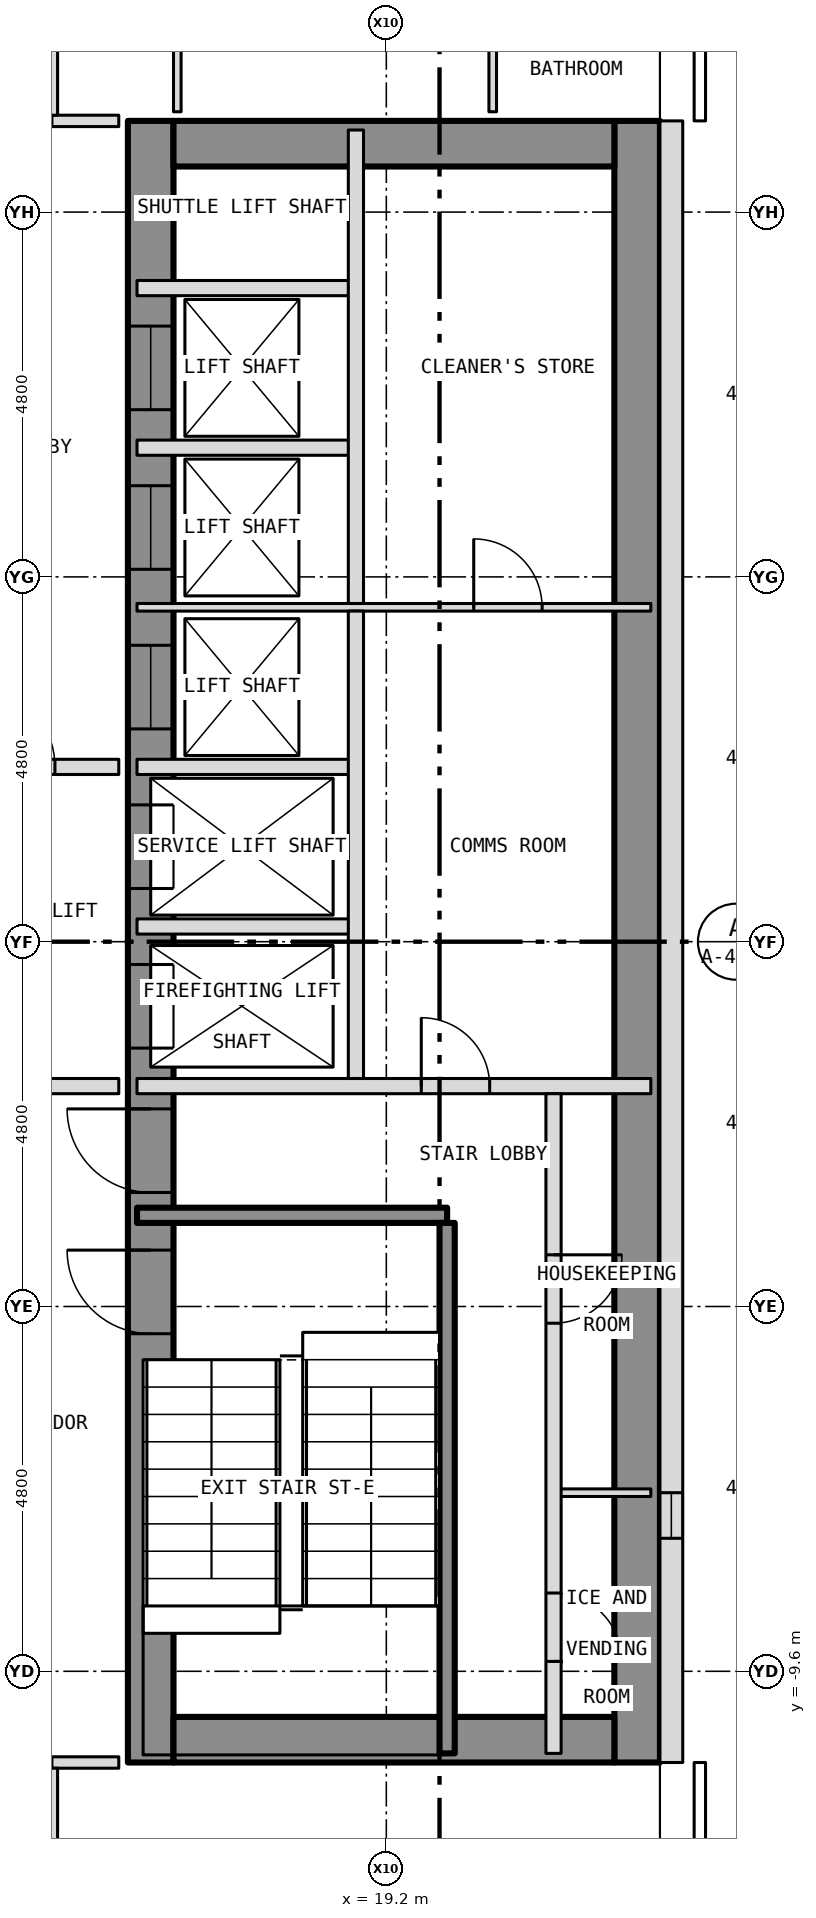
"""IFC4 building model, lengths in metres.
Left out: names, types, materials, properties, quantities, classifications, styles, units other than length and angle.
Written with IfcOpenShell. Run it as: python <this file> out.ifc"""

import sys

from ifc_helpers import new_model, si_unit, direction, frame, frame_2d, origin, place, context, subcontext, project, spatial, rectangle, extrude, element, fill, save


model = new_model("IFC4")
c1 = context("Model", 3, precision=1e-05, world=origin(), true_north=direction((0.0, 1.0)))
c2 = subcontext(c1, "Body", "Model", "MODEL_VIEW")
j1 = project(units=[si_unit("LENGTHUNIT", "METRE"), si_unit("PLANEANGLEUNIT", "RADIAN")], contexts=[c1])
p1 = place(None, origin())
s1 = spatial("IfcSite", under=j1, at=p1, CompositionType="ELEMENT")
p2 = place(p1, origin())
s2 = spatial("IfcBuilding", under=s1, at=p2, CompositionType="ELEMENT")
p3 = place(p2, frame((0.0, 0.0, 134.5)))
s3 = spatial("IfcBuildingStorey", under=s2, at=p3, CompositionType="ELEMENT", Elevation=134.5)
p4 = place(p3, frame((16.1, -10.8, 0.0), z_axis=(0.0, 0.0, 1.0), x_axis=(0.0, 1.0, 0.0)))
e1 = element("IfcWall", 1, at=p4, inside=s3, PredefinedType="SHEAR", context=c2, shape_type="SweptSolid", body=[
    extrude(rectangle(XDim=21.6, YDim=0.6, at=frame_2d((10.8, 0.0))), origin(), (0.0, 0.0, 1.0), 2.9),
])
p5 = place(p4, frame((9.4, 0.0, 0.0)))
e2 = element("IfcOpeningElement", 2, at=p5, cuts=e1, PredefinedType="OPENING", context=c2, shape_type="SweptSolid", body=[
    extrude(rectangle(XDim=1.1, YDim=2.1, at=frame_2d((0.55, 1.05))), frame((0.0, 0.312, 0.0), z_axis=(0.0, -1.0, 0.0), x_axis=(1.0, 0.0, 0.0)), (0.0, 0.0, 1.0), 0.624),
])
p6 = place(p4, frame((11.5, 0.0, 0.0)))
e3 = element("IfcOpeningElement", 3, at=p6, cuts=e1, PredefinedType="OPENING", context=c2, shape_type="SweptSolid", body=[
    extrude(rectangle(XDim=1.1, YDim=2.1, at=frame_2d((0.55, 1.05))), frame((0.0, 0.312, 0.0), z_axis=(0.0, -1.0, 0.0), x_axis=(1.0, 0.0, 0.0)), (0.0, 0.0, 1.0), 0.624),
])
p7 = place(p4, frame((13.6, 0.0, 0.0)))
e4 = element("IfcOpeningElement", 4, at=p7, cuts=e1, PredefinedType="OPENING", context=c2, shape_type="SweptSolid", body=[
    extrude(rectangle(XDim=1.1, YDim=2.1, at=frame_2d((0.55, 1.05))), frame((0.0, 0.312, 0.0), z_axis=(0.0, -1.0, 0.0), x_axis=(1.0, 0.0, 0.0)), (0.0, 0.0, 1.0), 0.624),
])
p8 = place(p4, frame((15.7, 0.0, 0.0)))
e5 = element("IfcOpeningElement", 5, at=p8, cuts=e1, PredefinedType="OPENING", context=c2, shape_type="SweptSolid", body=[
    extrude(rectangle(XDim=1.1, YDim=2.1, at=frame_2d((0.55, 1.05))), frame((0.0, 0.312, 0.0), z_axis=(0.0, -1.0, 0.0), x_axis=(1.0, 0.0, 0.0)), (0.0, 0.0, 1.0), 0.624),
])
p9 = place(p4, frame((17.8, 0.0, 0.0)))
e6 = element("IfcOpeningElement", 6, at=p9, cuts=e1, PredefinedType="OPENING", context=c2, shape_type="SweptSolid", body=[
    extrude(rectangle(XDim=1.1, YDim=2.1, at=frame_2d((0.55, 1.05))), frame((0.0, 0.312, 0.0), z_axis=(0.0, -1.0, 0.0), x_axis=(1.0, 0.0, 0.0)), (0.0, 0.0, 1.0), 0.624),
])
p10 = place(p4, frame((5.642, 0.0, 0.0)))
e7 = element("IfcOpeningElement", 7, at=p10, cuts=e1, PredefinedType="OPENING", context=c2, shape_type="SweptSolid", body=[
    extrude(rectangle(XDim=1.1, YDim=2.1, at=frame_2d((0.55, 1.05))), frame((0.0, 0.312, 0.0), z_axis=(0.0, -1.0, 0.0), x_axis=(1.0, 0.0, 0.0)), (0.0, 0.0, 1.0), 0.624),
])
p11 = place(p4, frame((7.5, 0.0, 0.0)))
e8 = element("IfcOpeningElement", 8, at=p11, cuts=e1, PredefinedType="OPENING", context=c2, shape_type="SweptSolid", body=[
    extrude(rectangle(XDim=1.1, YDim=2.1, at=frame_2d((0.55, 1.05))), frame((0.0, 0.312, 0.0), z_axis=(0.0, -1.0, 0.0), x_axis=(1.0, 0.0, 0.0)), (0.0, 0.0, 1.0), 0.624),
])
p12 = place(p3, frame((22.5, -10.8, 0.0), z_axis=(0.0, 0.0, 1.0), x_axis=(0.0, 1.0, 0.0)))
e9 = element("IfcWall", 9, at=p12, inside=s3, PredefinedType="SHEAR", context=c2, shape_type="SweptSolid", body=[
    extrude(rectangle(XDim=21.6, YDim=0.6, at=frame_2d((10.8, 0.0))), origin(), (0.0, 0.0, 1.0), 2.9),
])
for number, where, z_axis, x_axis in (
    (10, (16.4, 10.5, 0.0), (0.0, 0.0, 1.0), (1.0, 0.0, 0.0)),
    (11, (16.4, -10.5, 0.0), (0.0, 0.0, 1.0), (1.0, 0.0, 0.0)),
):
    element("IfcWall", number, at=place(p3, frame(where, z_axis=z_axis, x_axis=x_axis)), inside=s3, PredefinedType="SHEAR", context=c2, shape_type="SweptSolid", body=[
        extrude(rectangle(XDim=5.8, YDim=0.6, at=frame_2d((2.9, 0.0))), origin(), (0.0, 0.0, 1.0), 2.9),
    ])
p13 = place(p3, frame((22.95, -10.8, 0.0), z_axis=(0.0, 0.0, 1.0), x_axis=(0.0, 1.0, 0.0)))
e12 = element("IfcWall", 12, at=p13, inside=s3, PredefinedType="SOLIDWALL", context=c2, shape_type="SweptSolid", body=[
    extrude(rectangle(XDim=21.6, YDim=0.3, at=frame_2d((10.8, 0.0))), origin(), (0.0, 0.0, 1.0), 3.5),
])
p14 = place(p13, frame((2.95, 0.0, 1.0)))
e13 = element("IfcOpeningElement", 13, at=p14, cuts=e12, PredefinedType="OPENING", context=c2, shape_type="SweptSolid", body=[
    extrude(rectangle(XDim=0.6, YDim=1.5, at=frame_2d((0.3, 0.75))), frame((0.0, 0.162, 0.0), z_axis=(0.0, -1.0, 0.0), x_axis=(1.0, 0.0, 0.0)), (0.0, 0.0, 1.0), 0.324),
])
p15 = place(p3, frame((14.8, -10.8, 0.0), z_axis=(0.0, 0.0, 1.0), x_axis=(1.0, 0.0, 0.0)))
e14 = element("IfcWall", 14, at=p15, inside=s3, PredefinedType="PARTITIONING", context=c2, shape_type="SweptSolid", body=[
    extrude(rectangle(XDim=0.88, YDim=0.15, at=frame_2d((0.44, 0.0))), origin(), (0.0, 0.0, 1.0), 3.2),
])
p16 = place(p3, frame((21.4, -7.25, 0.0), z_axis=(0.0, 0.0, 1.0), x_axis=(1.0, 0.0, 0.0)))
e15 = element("IfcWall", 15, at=p16, inside=s3, PredefinedType="PARTITIONING", context=c2, shape_type="SweptSolid", body=[
    extrude(rectangle(XDim=1.28, YDim=0.1, at=frame_2d((0.64, 0.0))), origin(), (0.0, 0.0, 1.0), 2.9),
])
p17 = place(p3, frame((15.92, -3.6, 0.0), z_axis=(0.0, 0.0, 1.0), x_axis=(1.0, 0.0, 0.0)))
e16 = element("IfcWall", 16, at=p17, inside=s3, PredefinedType="SHEAR", context=c2, shape_type="SweptSolid", body=[
    extrude(rectangle(XDim=4.08, YDim=0.2, at=frame_2d((2.04, 0.0))), origin(), (0.0, 0.0, 1.0), 2.9),
])
p18 = place(p3, frame((12.4, -1.9, 0.0), z_axis=(0.0, 0.0, 1.0), x_axis=(1.0, 0.0, 0.0)))
e17 = element("IfcWall", 17, at=p18, inside=s3, PredefinedType="PARTITIONING", context=c2, shape_type="SweptSolid", body=[
    extrude(rectangle(XDim=3.28, YDim=0.2, at=frame_2d((1.64, 0.0))), origin(), (0.0, 0.0, 1.0), 3.2),
])
p19 = place(p18, frame((1.24, 0.0, 0.0)))
e18 = element("IfcOpeningElement", 18, at=p19, cuts=e17, PredefinedType="OPENING", context=c2, shape_type="SweptSolid", body=[
    extrude(rectangle(XDim=1.1, YDim=2.1, at=frame_2d((0.55, 1.05))), frame((0.0, 0.112, 0.0), z_axis=(0.0, -1.0, 0.0), x_axis=(1.0, 0.0, 0.0)), (0.0, 0.0, 1.0), 0.224),
])
p20 = place(p3, frame((15.92, -1.9, 0.0), z_axis=(0.0, 0.0, 1.0), x_axis=(1.0, 0.0, 0.0)))
e19 = element("IfcWall", 19, at=p20, inside=s3, PredefinedType="PARTITIONING", context=c2, shape_type="SweptSolid", body=[
    extrude(rectangle(XDim=6.76, YDim=0.2, at=frame_2d((3.38, 0.0))), origin(), (0.0, 0.0, 1.0), 2.9),
])
p21 = place(p20, frame((3.74, 0.0, 0.0)))
e20 = element("IfcOpeningElement", 20, at=p21, cuts=e19, PredefinedType="OPENING", context=c2, shape_type="SweptSolid", body=[
    extrude(rectangle(XDim=0.9, YDim=2.1, at=frame_2d((0.45, 1.05))), frame((0.0, 0.112, 0.0), z_axis=(0.0, -1.0, 0.0), x_axis=(1.0, 0.0, 0.0)), (0.0, 0.0, 1.0), 0.224),
])
p22 = place(p3, frame((15.92, 0.2, 0.0), z_axis=(0.0, 0.0, 1.0), x_axis=(1.0, 0.0, 0.0)))
e21 = element("IfcWall", 21, at=p22, inside=s3, PredefinedType="PARTITIONING", context=c2, shape_type="SweptSolid", body=[
    extrude(rectangle(XDim=2.88, YDim=0.2, at=frame_2d((1.44, 0.0))), origin(), (0.0, 0.0, 1.0), 2.9),
])
p23 = place(p3, frame((12.4, 2.3, 0.0), z_axis=(0.0, 0.0, 1.0), x_axis=(1.0, 0.0, 0.0)))
e22 = element("IfcWall", 22, at=p23, inside=s3, PredefinedType="PARTITIONING", context=c2, shape_type="SweptSolid", body=[
    extrude(rectangle(XDim=3.28, YDim=0.2, at=frame_2d((1.64, 0.0))), origin(), (0.0, 0.0, 1.0), 3.2),
])
p24 = place(p23, frame((1.34, 0.0, 0.0)))
e23 = element("IfcOpeningElement", 23, at=p24, cuts=e22, PredefinedType="OPENING", context=c2, shape_type="SweptSolid", body=[
    extrude(rectangle(XDim=1.1, YDim=2.1, at=frame_2d((0.55, 1.05))), frame((0.0, 0.112, 0.0), z_axis=(0.0, -1.0, 0.0), x_axis=(1.0, 0.0, 0.0)), (0.0, 0.0, 1.0), 0.224),
])
p25 = place(p3, frame((15.92, 2.3, 0.0), z_axis=(0.0, 0.0, 1.0), x_axis=(1.0, 0.0, 0.0)))
e24 = element("IfcWall", 24, at=p25, inside=s3, PredefinedType="PARTITIONING", context=c2, shape_type="SweptSolid", body=[
    extrude(rectangle(XDim=2.88, YDim=0.2, at=frame_2d((1.44, 0.0))), origin(), (0.0, 0.0, 1.0), 2.9),
])
p26 = place(p3, frame((15.92, 4.4, 0.0), z_axis=(0.0, 0.0, 1.0), x_axis=(1.0, 0.0, 0.0)))
e25 = element("IfcWall", 25, at=p26, inside=s3, PredefinedType="PARTITIONING", context=c2, shape_type="SweptSolid", body=[
    extrude(rectangle(XDim=6.76, YDim=0.1, at=frame_2d((3.38, 0.0))), origin(), (0.0, 0.0, 1.0), 2.9),
])
p27 = place(p26, frame((4.43, 0.0, 0.0)))
e26 = element("IfcOpeningElement", 26, at=p27, cuts=e25, PredefinedType="OPENING", context=c2, shape_type="SweptSolid", body=[
    extrude(rectangle(XDim=0.9, YDim=2.1, at=frame_2d((0.45, 1.05))), frame((0.0, 0.062, 0.0), z_axis=(0.0, -1.0, 0.0), x_axis=(1.0, 0.0, 0.0)), (0.0, 0.0, 1.0), 0.124),
])
for number, where, z_axis, x_axis in (
    (27, (15.92, 6.5, 0.0), (0.0, 0.0, 1.0), (1.0, 0.0, 0.0)),
    (28, (15.92, 8.6, 0.0), (0.0, 0.0, 1.0), (1.0, 0.0, 0.0)),
):
    element("IfcWall", number, at=place(p3, frame(where, z_axis=z_axis, x_axis=x_axis)), inside=s3, PredefinedType="PARTITIONING", context=c2, shape_type="SweptSolid", body=[
        extrude(rectangle(XDim=2.88, YDim=0.2, at=frame_2d((1.44, 0.0))), origin(), (0.0, 0.0, 1.0), 2.9),
    ])
p28 = place(p3, frame((14.8, 10.8, 0.0), z_axis=(0.0, 0.0, 1.0), x_axis=(1.0, 0.0, 0.0)))
e29 = element("IfcWall", 29, at=p28, inside=s3, PredefinedType="PARTITIONING", context=c2, shape_type="SweptSolid", body=[
    extrude(rectangle(XDim=0.88, YDim=0.15, at=frame_2d((0.44, 0.0))), origin(), (0.0, 0.0, 1.0), 3.2),
])
p29 = place(p3, frame((14.8, -14.725, 0.0), z_axis=(0.0, 0.0, 1.0), x_axis=(0.0, 1.0, 0.0)))
e30 = element("IfcWall", 30, at=p29, inside=s3, PredefinedType="PARTITIONING", context=c2, shape_type="SweptSolid", body=[
    extrude(rectangle(XDim=3.85, YDim=0.15, at=frame_2d((1.925, 0.0))), origin(), (0.0, 0.0, 1.0), 3.2),
])
p30 = place(p29, frame((0.525, 0.0, 0.0)))
e31 = element("IfcOpeningElement", 31, at=p30, cuts=e30, PredefinedType="OPENING", context=c2, shape_type="SweptSolid", body=[
    extrude(rectangle(XDim=1.0, YDim=2.1, at=frame_2d((0.5, 1.05))), frame((0.0, 0.087, 0.0), z_axis=(0.0, -1.0, 0.0), x_axis=(1.0, 0.0, 0.0)), (0.0, 0.0, 1.0), 0.174),
])
p31 = place(p3, frame((14.8, 10.875, 0.0), z_axis=(0.0, 0.0, 1.0), x_axis=(0.0, 1.0, 0.0)))
e32 = element("IfcWall", 32, at=p31, inside=s3, PredefinedType="PARTITIONING", context=c2, shape_type="SweptSolid", body=[
    extrude(rectangle(XDim=3.85, YDim=0.15, at=frame_2d((1.925, 0.0))), origin(), (0.0, 0.0, 1.0), 3.2),
])
p32 = place(p31, frame((2.325, 0.0, 0.0)))
e33 = element("IfcOpeningElement", 33, at=p32, cuts=e32, PredefinedType="OPENING", context=c2, shape_type="SweptSolid", body=[
    extrude(rectangle(XDim=1.0, YDim=2.1, at=frame_2d((0.5, 1.05))), frame((0.0, 0.087, 0.0), z_axis=(0.0, -1.0, 0.0), x_axis=(1.0, 0.0, 0.0)), (0.0, 0.0, 1.0), 0.174),
])
p33 = place(p3, frame((16.45, 10.92, 0.0), z_axis=(0.0, 0.0, 1.0), x_axis=(0.0, 1.0, 0.0)))
e34 = element("IfcWall", 34, at=p33, inside=s3, PredefinedType="PARTITIONING", context=c2, shape_type="SweptSolid", body=[
    extrude(rectangle(XDim=12.36, YDim=0.1, at=frame_2d((6.18, 0.0))), origin(), (0.0, 0.0, 1.0), 3.2),
])
p34 = place(p33, frame((5.43, 0.0, 0.0)))
e35 = element("IfcOpeningElement", 35, at=p34, cuts=e34, PredefinedType="OPENING", context=c2, shape_type="SweptSolid", body=[
    extrude(rectangle(XDim=0.9, YDim=2.1, at=frame_2d((0.45, 1.05))), frame((0.0, 0.062, 0.0), z_axis=(0.0, -1.0, 0.0), x_axis=(1.0, 0.0, 0.0)), (0.0, 0.0, 1.0), 0.124),
])
p35 = place(p3, frame((18.8, -1.8, 0.0), z_axis=(0.0, 0.0, 1.0), x_axis=(0.0, 1.0, 0.0)))
e36 = element("IfcWall", 36, at=p35, inside=s3, PredefinedType="PARTITIONING", context=c2, shape_type="SweptSolid", body=[
    extrude(rectangle(XDim=6.15, YDim=0.2, at=frame_2d((3.075, 0.0))), origin(), (0.0, 0.0, 1.0), 2.9),
])
p36 = place(p3, frame((18.8, 4.45, 0.0), z_axis=(0.0, 0.0, 1.0), x_axis=(0.0, 1.0, 0.0)))
e37 = element("IfcWall", 37, at=p36, inside=s3, PredefinedType="PARTITIONING", context=c2, shape_type="SweptSolid", body=[
    extrude(rectangle(XDim=6.23, YDim=0.2, at=frame_2d((3.115, 0.0))), origin(), (0.0, 0.0, 1.0), 2.9),
])
p37 = place(p3, frame((20.0, -10.68, 0.0), z_axis=(0.0, 0.0, 1.0), x_axis=(0.0, 1.0, 0.0)))
e38 = element("IfcWall", 38, at=p37, inside=s3, PredefinedType="SHEAR", context=c2, shape_type="SweptSolid", body=[
    extrude(rectangle(XDim=6.98, YDim=0.2, at=frame_2d((3.49, 0.0))), origin(), (0.0, 0.0, 1.0), 2.9),
])
p38 = place(p3, frame((20.6, 10.92, 0.0), z_axis=(0.0, 0.0, 1.0), x_axis=(0.0, 1.0, 0.0)))
e39 = element("IfcWall", 39, at=p38, inside=s3, PredefinedType="PARTITIONING", context=c2, shape_type="SweptSolid", body=[
    extrude(rectangle(XDim=3.03, YDim=0.1, at=frame_2d((1.515, 0.0))), origin(), (0.0, 0.0, 1.0), 3.2),
])
p39 = place(p38, frame((1.67, 0.0, 0.0)))
e40 = element("IfcOpeningElement", 40, at=p39, cuts=e39, PredefinedType="OPENING", context=c2, shape_type="SweptSolid", body=[
    extrude(rectangle(XDim=0.9, YDim=2.1, at=frame_2d((0.45, 1.05))), frame((0.0, 0.062, 0.0), z_axis=(0.0, -1.0, 0.0), x_axis=(1.0, 0.0, 0.0)), (0.0, 0.0, 1.0), 0.124),
])
p40 = place(p3, frame((21.4, -10.68, 0.0), z_axis=(0.0, 0.0, 1.0), x_axis=(0.0, 1.0, 0.0)))
e41 = element("IfcWall", 41, at=p40, inside=s3, PredefinedType="PARTITIONING", context=c2, shape_type="SweptSolid", body=[
    extrude(rectangle(XDim=8.68, YDim=0.2, at=frame_2d((4.34, 0.0))), origin(), (0.0, 0.0, 1.0), 2.9),
])
p41 = place(p40, frame((1.21, 0.0, 0.0)))
e42 = element("IfcOpeningElement", 42, at=p41, cuts=e41, PredefinedType="OPENING", context=c2, shape_type="SweptSolid", body=[
    extrude(rectangle(XDim=0.9, YDim=2.1, at=frame_2d((0.45, 1.05))), frame((0.0, 0.112, 0.0), z_axis=(0.0, -1.0, 0.0), x_axis=(1.0, 0.0, 0.0)), (0.0, 0.0, 1.0), 0.224),
])
p42 = place(p40, frame((5.66, 0.0, 0.0)))
e43 = element("IfcOpeningElement", 43, at=p42, cuts=e41, PredefinedType="OPENING", context=c2, shape_type="SweptSolid", body=[
    extrude(rectangle(XDim=0.9, YDim=2.1, at=frame_2d((0.45, 1.05))), frame((0.0, 0.112, 0.0), z_axis=(0.0, -1.0, 0.0), x_axis=(1.0, 0.0, 0.0)), (0.0, 0.0, 1.0), 0.224),
])
p43 = place(p14, origin())
e44 = element("IfcWindow", 44, at=p43, inside=s3, PartitioningType="SINGLE_PANEL", PredefinedType="WINDOW", context=c2, shape_type="SweptSolid", body=[
    extrude(rectangle(XDim=0.6, YDim=1.5, at=frame_2d((0.3, 0.75))), frame((0.0, -0.06, 0.0), z_axis=(0.0, -1.0, 0.0), x_axis=(1.0, 0.0, 0.0)), (0.0, 0.0, 1.0), 0.06),
])
fill(e13, e44)
p44 = place(p5, origin())
e45 = element("IfcDoor", 45, at=p44, inside=s3, OperationType="SLIDING_TO_LEFT", PredefinedType="DOOR", context=c2, shape_type="SweptSolid", body=[
    extrude(rectangle(XDim=1.1, YDim=2.1, at=frame_2d((0.55, 1.05))), frame((0.0, 0.025, 0.0), z_axis=(0.0, -1.0, 0.0), x_axis=(1.0, 0.0, 0.0)), (0.0, 0.0, 1.0), 0.05),
])
fill(e2, e45)
p45 = place(p6, origin())
e46 = element("IfcDoor", 46, at=p45, inside=s3, OperationType="SLIDING_TO_LEFT", PredefinedType="DOOR", context=c2, shape_type="SweptSolid", body=[
    extrude(rectangle(XDim=1.1, YDim=2.1, at=frame_2d((0.55, 1.05))), frame((0.0, 0.025, 0.0), z_axis=(0.0, -1.0, 0.0), x_axis=(1.0, 0.0, 0.0)), (0.0, 0.0, 1.0), 0.05),
])
fill(e3, e46)
p46 = place(p7, origin())
e47 = element("IfcDoor", 47, at=p46, inside=s3, OperationType="SLIDING_TO_LEFT", PredefinedType="DOOR", context=c2, shape_type="SweptSolid", body=[
    extrude(rectangle(XDim=1.1, YDim=2.1, at=frame_2d((0.55, 1.05))), frame((0.0, 0.025, 0.0), z_axis=(0.0, -1.0, 0.0), x_axis=(1.0, 0.0, 0.0)), (0.0, 0.0, 1.0), 0.05),
])
fill(e4, e47)
p47 = place(p8, origin())
e48 = element("IfcDoor", 48, at=p47, inside=s3, OperationType="SLIDING_TO_LEFT", PredefinedType="DOOR", context=c2, shape_type="SweptSolid", body=[
    extrude(rectangle(XDim=1.1, YDim=2.1, at=frame_2d((0.55, 1.05))), frame((0.0, 0.025, 0.0), z_axis=(0.0, -1.0, 0.0), x_axis=(1.0, 0.0, 0.0)), (0.0, 0.0, 1.0), 0.05),
])
fill(e5, e48)
p48 = place(p9, origin())
e49 = element("IfcDoor", 49, at=p48, inside=s3, OperationType="SLIDING_TO_LEFT", PredefinedType="DOOR", context=c2, shape_type="SweptSolid", body=[
    extrude(rectangle(XDim=1.1, YDim=2.1, at=frame_2d((0.55, 1.05))), frame((0.0, 0.025, 0.0), z_axis=(0.0, -1.0, 0.0), x_axis=(1.0, 0.0, 0.0)), (0.0, 0.0, 1.0), 0.05),
])
fill(e6, e49)
p49 = place(p10, origin())
e50 = element("IfcDoor", 50, at=p49, inside=s3, OperationType="SINGLE_SWING_RIGHT", PredefinedType="DOOR", context=c2, shape_type="SweptSolid", body=[
    extrude(rectangle(XDim=1.1, YDim=2.1, at=frame_2d((0.55, 1.05))), frame((0.0, 0.025, 0.0), z_axis=(0.0, -1.0, 0.0), x_axis=(1.0, 0.0, 0.0)), (0.0, 0.0, 1.0), 0.05),
])
fill(e7, e50)
p50 = place(p11, origin())
e51 = element("IfcDoor", 51, at=p50, inside=s3, OperationType="SINGLE_SWING_RIGHT", PredefinedType="DOOR", context=c2, shape_type="SweptSolid", body=[
    extrude(rectangle(XDim=1.1, YDim=2.1, at=frame_2d((0.55, 1.05))), frame((0.0, 0.025, 0.0), z_axis=(0.0, -1.0, 0.0), x_axis=(1.0, 0.0, 0.0)), (0.0, 0.0, 1.0), 0.05),
])
fill(e8, e51)
p51 = place(p41, origin())
e52 = element("IfcDoor", 52, at=p51, inside=s3, OperationType="SINGLE_SWING_LEFT", PredefinedType="DOOR", context=c2, shape_type="SweptSolid", body=[
    extrude(rectangle(XDim=0.9, YDim=2.1, at=frame_2d((0.45, 1.05))), frame((0.0, 0.025, 0.0), z_axis=(0.0, -1.0, 0.0), x_axis=(1.0, 0.0, 0.0)), (0.0, 0.0, 1.0), 0.05),
])
fill(e42, e52)
p52 = place(p42, origin())
e53 = element("IfcDoor", 53, at=p52, inside=s3, OperationType="SINGLE_SWING_RIGHT", PredefinedType="DOOR", context=c2, shape_type="SweptSolid", body=[
    extrude(rectangle(XDim=0.9, YDim=2.1, at=frame_2d((0.45, 1.05))), frame((0.0, 0.025, 0.0), z_axis=(0.0, -1.0, 0.0), x_axis=(1.0, 0.0, 0.0)), (0.0, 0.0, 1.0), 0.05),
])
fill(e43, e53)
p53 = place(p21, origin())
e54 = element("IfcDoor", 54, at=p53, inside=s3, OperationType="SINGLE_SWING_LEFT", PredefinedType="DOOR", context=c2, shape_type="SweptSolid", body=[
    extrude(rectangle(XDim=0.9, YDim=2.1, at=frame_2d((0.45, 1.05))), frame((0.0, 0.025, 0.0), z_axis=(0.0, -1.0, 0.0), x_axis=(1.0, 0.0, 0.0)), (0.0, 0.0, 1.0), 0.05),
])
fill(e20, e54)
p54 = place(p27, origin())
e55 = element("IfcDoor", 55, at=p54, inside=s3, OperationType="SINGLE_SWING_LEFT", PredefinedType="DOOR", context=c2, shape_type="SweptSolid", body=[
    extrude(rectangle(XDim=0.9, YDim=2.1, at=frame_2d((0.45, 1.05))), frame((0.0, 0.025, 0.0), z_axis=(0.0, -1.0, 0.0), x_axis=(1.0, 0.0, 0.0)), (0.0, 0.0, 1.0), 0.05),
])
fill(e26, e55)
p55 = place(p24, origin())
e56 = element("IfcDoor", 56, at=p55, inside=s3, OperationType="SINGLE_SWING_LEFT", PredefinedType="DOOR", context=c2, shape_type="SweptSolid", body=[
    extrude(rectangle(XDim=1.1, YDim=2.1, at=frame_2d((0.55, 1.05))), frame((0.0, 0.025, 0.0), z_axis=(0.0, -1.0, 0.0), x_axis=(1.0, 0.0, 0.0)), (0.0, 0.0, 1.0), 0.05),
])
fill(e23, e56)
save(model, sys.argv[1])
